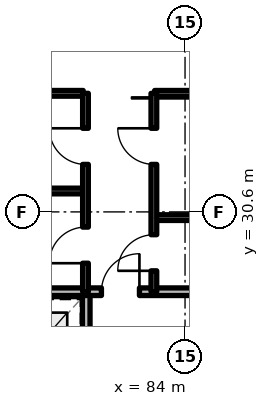
"""IFC4 building model, lengths in metres.
Left out: names, types, materials, properties, quantities, classifications, styles, units other than length and angle.
Written with IfcOpenShell. Run it as: python <this file> out.ifc"""

import sys

from ifc_helpers import new_model, si_unit, direction, frame, frame_2d, origin, place, context, subcontext, project, spatial, rectangle, extrude, element, fill, save


model = new_model("IFC4")
c1 = context("Model", 3, precision=1e-05, world=origin(), true_north=direction((0.0, 1.0)))
c2 = subcontext(c1, "Body", "Model", "MODEL_VIEW")
j1 = project(units=[si_unit("LENGTHUNIT", "METRE"), si_unit("PLANEANGLEUNIT", "RADIAN")], contexts=[c1])
p1 = place(None, origin())
s1 = spatial("IfcSite", under=j1, at=p1, CompositionType="ELEMENT")
p2 = place(p1, origin())
s2 = spatial("IfcBuilding", under=s1, at=p2, CompositionType="ELEMENT")
p3 = place(p2, frame((0.0, 0.0, 145.2)))
s3 = spatial("IfcBuildingStorey", under=s2, at=p3, CompositionType="ELEMENT", Elevation=145.2)
p4 = place(p3, frame((81.4, 24.92, 0.0), z_axis=(0.0, 0.0, 1.0), x_axis=(0.0, 1.0, 0.0)))
e1 = element("IfcWall", 1, at=p4, inside=s3, PredefinedType="SOLIDWALL", context=c2, shape_type="SweptSolid", body=[
    extrude(rectangle(XDim=3.58, YDim=0.2, at=frame_2d((1.79, 0.0))), origin(), (0.0, 0.0, 1.0), 2.35),
])
p5 = place(p4, frame((1.3, 0.0, 0.0)))
e2 = element("IfcOpeningElement", 2, at=p5, cuts=e1, PredefinedType="OPENING", context=c2, shape_type="SweptSolid", body=[
    extrude(rectangle(XDim=1.1, YDim=2.2, at=frame_2d((0.55, 1.1))), frame((0.0, 0.11, 0.0), z_axis=(0.0, -1.0, 0.0), x_axis=(1.0, 0.0, 0.0)), (0.0, 0.0, 1.0), 0.22),
])
p6 = place(p3, frame((78.27, 28.5, 0.0), z_axis=(0.0, 0.0, 1.0), x_axis=(1.0, 0.0, 0.0)))
e3 = element("IfcWall", 3, at=p6, inside=s3, PredefinedType="SOLIDWALL", context=c2, shape_type="SweptSolid", body=[
    extrude(rectangle(XDim=7.51, YDim=0.2, at=frame_2d((3.755, 0.0))), origin(), (0.0, 0.0, 1.0), 2.35),
])
p7 = place(p6, frame((3.53, 0.0, 0.0)))
e4 = element("IfcOpeningElement", 4, at=p7, cuts=e3, PredefinedType="OPENING", context=c2, shape_type="SweptSolid", body=[
    extrude(rectangle(XDim=1.0, YDim=2.15, at=frame_2d((0.5, 1.075))), frame((0.0, 0.11, 0.0), z_axis=(0.0, -1.0, 0.0), x_axis=(1.0, 0.0, 0.0)), (0.0, 0.0, 1.0), 0.22),
])
for number, where, z_axis, x_axis in (
    (5, (83.2, 30.45, 0.0), (0.0, 0.0, 1.0), (1.0, 0.0, 0.0)),
    (6, (83.2, 33.72, 0.0), (0.0, 0.0, 1.0), (1.0, 0.0, 0.0)),
):
    element("IfcWall", number, at=place(p3, frame(where, z_axis=z_axis, x_axis=x_axis)), inside=s3, PredefinedType="SOLIDWALL", context=c2, shape_type="SweptSolid", body=[
        extrude(rectangle(XDim=2.58, YDim=0.15, at=frame_2d((1.29, 0.0))), origin(), (0.0, 0.0, 1.0), 2.35),
    ])
p8 = place(p3, frame((83.18, 28.5, 0.0), z_axis=(0.0, 0.0, 1.0), x_axis=(0.0, 1.0, 0.0)))
e7 = element("IfcWall", 7, at=p8, inside=s3, PredefinedType="SOLIDWALL", context=c2, shape_type="SweptSolid", body=[
    extrude(rectangle(XDim=5.22, YDim=0.15, at=frame_2d((2.61, 0.0))), origin(), (0.0, 0.0, 1.0), 2.35),
])
p9 = place(p8, frame((0.55, 0.0, 0.0)))
e8 = element("IfcOpeningElement", 8, at=p9, cuts=e7, PredefinedType="OPENING", context=c2, shape_type="SweptSolid", body=[
    extrude(rectangle(XDim=0.95, YDim=2.15, at=frame_2d((0.475, 1.075))), frame((0.0, 0.085, 0.0), z_axis=(0.0, -1.0, 0.0), x_axis=(1.0, 0.0, 0.0)), (0.0, 0.0, 1.0), 0.17),
])
p10 = place(p8, frame((3.35, 0.0, 0.0)))
e9 = element("IfcOpeningElement", 9, at=p10, cuts=e7, PredefinedType="OPENING", context=c2, shape_type="SweptSolid", body=[
    extrude(rectangle(XDim=0.95, YDim=2.15, at=frame_2d((0.475, 1.075))), frame((0.0, 0.085, 0.0), z_axis=(0.0, -1.0, 0.0), x_axis=(1.0, 0.0, 0.0)), (0.0, 0.0, 1.0), 0.17),
])
for number, where, z_axis, x_axis in (
    (10, (78.27, 31.15, 0.0), (0.0, 0.0, 1.0), (1.0, 0.0, 0.0)),
    (11, (78.27, 33.72, 0.0), (0.0, 0.0, 1.0), (1.0, 0.0, 0.0)),
):
    element("IfcWall", number, at=place(p3, frame(where, z_axis=z_axis, x_axis=x_axis)), inside=s3, PredefinedType="SOLIDWALL", context=c2, shape_type="SweptSolid", body=[
        extrude(rectangle(XDim=3.05, YDim=0.15, at=frame_2d((1.525, 0.0))), origin(), (0.0, 0.0, 1.0), 2.35),
    ])
p11 = place(p3, frame((81.38, 28.5, 0.0), z_axis=(0.0, 0.0, 1.0), x_axis=(0.0, 1.0, 0.0)))
e12 = element("IfcWall", 12, at=p11, inside=s3, PredefinedType="SOLIDWALL", context=c2, shape_type="SweptSolid", body=[
    extrude(rectangle(XDim=5.22, YDim=0.15, at=frame_2d((2.61, 0.0))), origin(), (0.0, 0.0, 1.0), 2.35),
])
p12 = place(p11, frame((0.75, 0.0, 0.0)))
e13 = element("IfcOpeningElement", 13, at=p12, cuts=e12, PredefinedType="OPENING", context=c2, shape_type="SweptSolid", body=[
    extrude(rectangle(XDim=0.95, YDim=2.15, at=frame_2d((0.475, 1.075))), frame((0.0, 0.085, 0.0), z_axis=(0.0, -1.0, 0.0), x_axis=(1.0, 0.0, 0.0)), (0.0, 0.0, 1.0), 0.17),
])
p13 = place(p11, frame((3.35, 0.0, 0.0)))
e14 = element("IfcOpeningElement", 14, at=p13, cuts=e12, PredefinedType="OPENING", context=c2, shape_type="SweptSolid", body=[
    extrude(rectangle(XDim=0.95, YDim=2.15, at=frame_2d((0.475, 1.075))), frame((0.0, 0.085, 0.0), z_axis=(0.0, -1.0, 0.0), x_axis=(1.0, 0.0, 0.0)), (0.0, 0.0, 1.0), 0.17),
])
p14 = place(p7, origin())
e15 = element("IfcDoor", 15, at=p14, inside=s3, OperationType="SINGLE_SWING_RIGHT", PredefinedType="DOOR", context=c2, shape_type="SweptSolid", body=[
    extrude(rectangle(XDim=1.0, YDim=2.15, at=frame_2d((0.5, 1.075))), frame((0.0, 0.025, 0.0), z_axis=(0.0, -1.0, 0.0), x_axis=(1.0, 0.0, 0.0)), (0.0, 0.0, 1.0), 0.05),
])
fill(e4, e15)
p15 = place(p9, origin())
e16 = element("IfcDoor", 16, at=p15, inside=s3, OperationType="SINGLE_SWING_LEFT", PredefinedType="DOOR", context=c2, shape_type="SweptSolid", body=[
    extrude(rectangle(XDim=0.95, YDim=2.15, at=frame_2d((0.475, 1.075))), frame((0.0, 0.025, 0.0), z_axis=(0.0, -1.0, 0.0), x_axis=(1.0, 0.0, 0.0)), (0.0, 0.0, 1.0), 0.05),
])
fill(e8, e16)
p16 = place(p10, origin())
e17 = element("IfcDoor", 17, at=p16, inside=s3, OperationType="SINGLE_SWING_RIGHT", PredefinedType="DOOR", context=c2, shape_type="SweptSolid", body=[
    extrude(rectangle(XDim=0.95, YDim=2.15, at=frame_2d((0.475, 1.075))), frame((0.0, 0.025, 0.0), z_axis=(0.0, -1.0, 0.0), x_axis=(1.0, 0.0, 0.0)), (0.0, 0.0, 1.0), 0.05),
])
fill(e9, e17)
p17 = place(p12, origin())
e18 = element("IfcDoor", 18, at=p17, inside=s3, OperationType="SINGLE_SWING_LEFT", PredefinedType="DOOR", context=c2, shape_type="SweptSolid", body=[
    extrude(rectangle(XDim=0.95, YDim=2.15, at=frame_2d((0.475, 1.075))), frame((0.0, 0.025, 0.0), z_axis=(0.0, -1.0, 0.0), x_axis=(1.0, 0.0, 0.0)), (0.0, 0.0, 1.0), 0.05),
])
fill(e13, e18)
p18 = place(p13, origin())
e19 = element("IfcDoor", 19, at=p18, inside=s3, OperationType="SINGLE_SWING_RIGHT", PredefinedType="DOOR", context=c2, shape_type="SweptSolid", body=[
    extrude(rectangle(XDim=0.95, YDim=2.15, at=frame_2d((0.475, 1.075))), frame((0.0, 0.025, 0.0), z_axis=(0.0, -1.0, 0.0), x_axis=(1.0, 0.0, 0.0)), (0.0, 0.0, 1.0), 0.05),
])
fill(e14, e19)
save(model, sys.argv[1])
